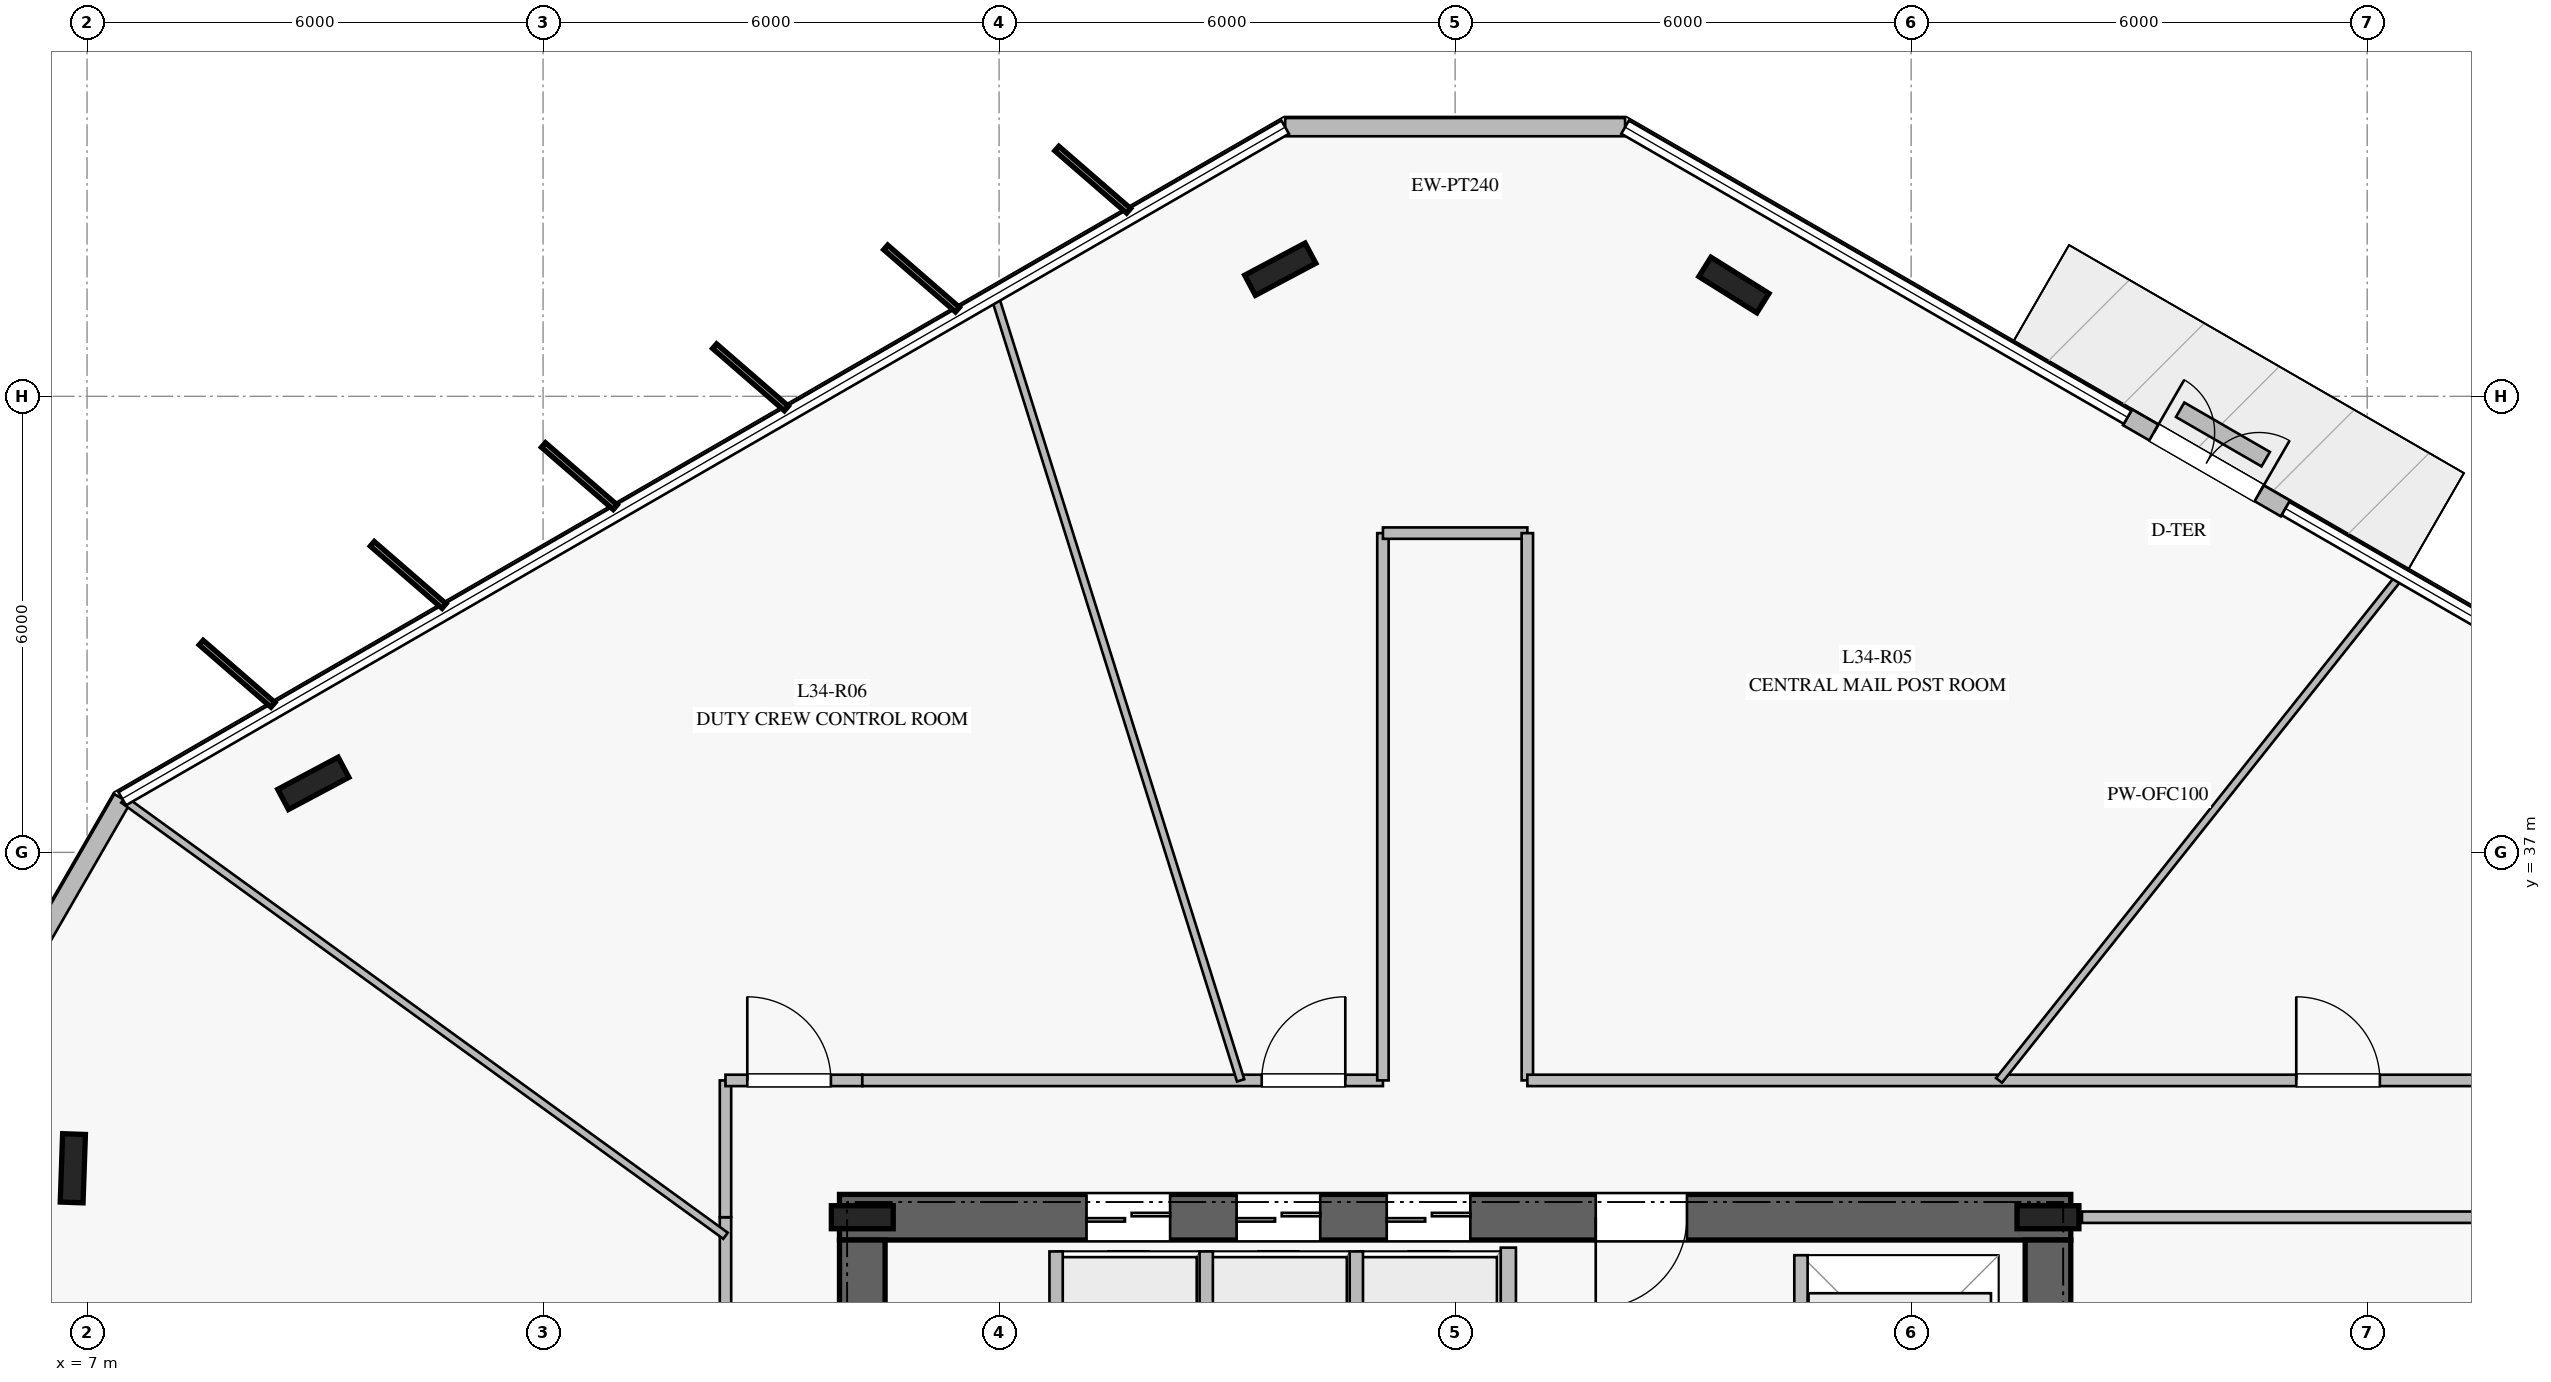
"""IFC4 building model, lengths in metres.
Left out: names, types, materials, properties, quantities, classifications, styles, units other than length and angle.
Written with IfcOpenShell. Run it as: python <this file> out.ifc"""

import sys

from ifc_helpers import new_model, si_unit, direction, frame, frame_2d, origin, origin_2d, place, context, subcontext, project, spatial, rectangle, i_section, extrude, element, fill, save


model = new_model("IFC4")
c1 = context("Model", 3, precision=1e-05, world=origin(), true_north=direction((0.0, 1.0)))
c2 = subcontext(c1, "Body", "Model", "MODEL_VIEW")
j1 = project(units=[si_unit("LENGTHUNIT", "METRE"), si_unit("PLANEANGLEUNIT", "RADIAN")], contexts=[c1])
p1 = place(None, origin())
s1 = spatial("IfcSite", under=j1, at=p1, CompositionType="ELEMENT")
p2 = place(p1, origin())
s2 = spatial("IfcBuilding", under=s1, at=p2, CompositionType="ELEMENT")
p3 = place(p2, frame((0.0, 0.0, 142.4)))
s3 = spatial("IfcBuildingStorey", under=s2, at=p3, CompositionType="ELEMENT", Elevation=142.4)
p4 = place(p3, frame((33.1, 32.2, 0.0), z_axis=(0.0, 0.0, 1.0), x_axis=(-1.0, 0.0, 0.0)))
e1 = element("IfcWall", 1, at=p4, inside=s3, PredefinedType="SHEAR", context=c2, shape_type="SweptSolid", body=[
    extrude(rectangle(XDim=16.2, YDim=0.6, at=frame_2d((8.1, 0.0))), origin(), (0.0, 0.0, 1.0), 3.76),
])
p5 = place(p4, frame((5.05, 0.0, 0.0)))
e2 = element("IfcOpeningElement", 2, at=p5, cuts=e1, PredefinedType="OPENING", context=c2, shape_type="SweptSolid", body=[
    extrude(rectangle(XDim=1.2, YDim=2.25, at=frame_2d((0.6, 1.125))), frame((0.0, 0.31, 0.0), z_axis=(0.0, -1.0, 0.0), x_axis=(1.0, 0.0, 0.0)), (0.0, 0.0, 1.0), 0.62),
])
p6 = place(p4, frame((11.85, 0.0, 0.0)))
e3 = element("IfcOpeningElement", 3, at=p6, cuts=e1, PredefinedType="OPENING", context=c2, shape_type="SweptSolid", body=[
    extrude(rectangle(XDim=1.1, YDim=2.2, at=frame_2d((0.55, 1.1))), frame((0.0, 0.31, 0.0), z_axis=(0.0, -1.0, 0.0), x_axis=(1.0, 0.0, 0.0)), (0.0, 0.0, 1.0), 0.62),
])
p7 = place(p4, frame((9.875, 0.0, 0.0)))
e4 = element("IfcOpeningElement", 4, at=p7, cuts=e1, PredefinedType="OPENING", context=c2, shape_type="SweptSolid", body=[
    extrude(rectangle(XDim=1.1, YDim=2.2, at=frame_2d((0.55, 1.1))), frame((0.0, 0.31, 0.0), z_axis=(0.0, -1.0, 0.0), x_axis=(1.0, 0.0, 0.0)), (0.0, 0.0, 1.0), 0.62),
])
p8 = place(p4, frame((7.9, 0.0, 0.0)))
e5 = element("IfcOpeningElement", 5, at=p8, cuts=e1, PredefinedType="OPENING", context=c2, shape_type="SweptSolid", body=[
    extrude(rectangle(XDim=1.1, YDim=2.2, at=frame_2d((0.55, 1.1))), frame((0.0, 0.31, 0.0), z_axis=(0.0, -1.0, 0.0), x_axis=(1.0, 0.0, 0.0)), (0.0, 0.0, 1.0), 0.62),
])
p9 = place(p3, frame((17.2, 31.9, 0.0), z_axis=(0.0, 0.0, 1.0), x_axis=(0.0, -1.0, 0.0)))
e6 = element("IfcWall", 6, at=p9, inside=s3, PredefinedType="SHEAR", context=c2, shape_type="SweptSolid", body=[
    extrude(rectangle(XDim=13.8, YDim=0.6, at=frame_2d((6.9, 0.0))), origin(), (0.0, 0.0, 1.0), 3.76),
])
p10 = place(p9, frame((2.05, 0.0, 0.0)))
e7 = element("IfcOpeningElement", 7, at=p10, cuts=e6, PredefinedType="OPENING", context=c2, shape_type="SweptSolid", body=[
    extrude(rectangle(XDim=1.5, YDim=2.2, at=frame_2d((0.75, 1.1))), frame((0.0, 0.31, 0.0), z_axis=(0.0, -1.0, 0.0), x_axis=(1.0, 0.0, 0.0)), (0.0, 0.0, 1.0), 0.62),
])
p11 = place(p3, frame((32.8, 18.1, 0.0), z_axis=(0.0, 0.0, 1.0), x_axis=(0.0, 1.0, 0.0)))
e8 = element("IfcWall", 8, at=p11, inside=s3, PredefinedType="SHEAR", context=c2, shape_type="SweptSolid", body=[
    extrude(rectangle(XDim=13.8, YDim=0.6, at=frame_2d((6.9, 0.0))), origin(), (0.0, 0.0, 1.0), 3.76),
])
for number, where, z_axis, x_axis in (
    (9, (32.8, 32.2, 0.0), (0.0, 0.0, 1.0), (1.0, 0.0, 0.0)),
    (10, (17.2, 32.2, 0.0), (0.0, 0.0, 1.0), (1.0, 0.0, 0.0)),
):
    element("IfcColumn", number, at=place(p3, frame(where, z_axis=z_axis, x_axis=x_axis)), inside=s3, PredefinedType="COLUMN", context=c2, shape_type="SweptSolid", body=[
        extrude(i_section(OverallWidth=0.303, OverallDepth=0.814, WebThickness=0.021, FlangeThickness=0.04, at=origin_2d()), origin(), (0.0, 0.0, 1.0), 4.0),
    ])
for number, where, z_axis, x_axis in (
    (11, (28.668, 44.464, 0.0), (0.0, 0.0, 1.0), (-0.848, 0.53, 0.0)),
    (12, (22.699, 44.672, 0.0), (0.0, 0.0, 1.0), (0.883, 0.469, 0.0)),
    (13, (9.977, 37.908, 0.0), (0.0, 0.0, 1.0), (0.883, 0.469, 0.0)),
    (14, (6.813, 32.844, 0.0), (0.0, 0.0, 1.0), (0.035, 0.999, 0.0)),
):
    element("IfcColumn", number, at=place(p3, frame(where, z_axis=z_axis, x_axis=x_axis)), inside=s3, PredefinedType="COLUMN", context=c2, shape_type="SweptSolid", body=[
        extrude(i_section(OverallWidth=0.3, OverallDepth=0.9, WebThickness=0.019, FlangeThickness=0.035, at=origin_2d()), origin(), (0.0, 0.0, 1.0), 4.0),
    ])
p12 = place(p3, frame((35.925, 41.524, 0.0), z_axis=(0.0, 0.0, 1.0), x_axis=(-0.865955154139, 0.50012165622, 0.0)))
e15 = element("IfcWall", 15, at=p12, inside=s3, PredefinedType="STANDARD", context=c2, shape_type="SweptSolid", body=[
    extrude(rectangle(XDim=2.4, YDim=0.24, at=frame_2d((1.2, 0.0))), origin(), (0.0, 0.0, 1.0), 3.76),
])
p13 = place(p12, frame((0.4, 0.0, 0.0)))
e16 = element("IfcOpeningElement", 16, at=p13, cuts=e15, PredefinedType="OPENING", context=c2, shape_type="SweptSolid", body=[
    extrude(rectangle(XDim=1.6, YDim=2.25, at=frame_2d((0.8, 1.125))), frame((0.0, 0.13, 0.0), z_axis=(0.0, -1.0, 0.0), x_axis=(1.0, 0.0, 0.0)), (0.0, 0.0, 1.0), 0.26),
])
p14 = place(p3, frame((27.236, 46.541, 0.0), z_axis=(0.0, 0.0, 1.0), x_axis=(-1.0, 0.0, 0.0)))
e17 = element("IfcWall", 17, at=p14, inside=s3, PredefinedType="STANDARD", context=c2, shape_type="SweptSolid", body=[
    extrude(rectangle(XDim=4.472, YDim=0.24, at=frame_2d((2.236, 0.0))), origin(), (0.0, 0.0, 1.0), 3.76),
])
p15 = place(p3, frame((7.463, 37.706, 0.0), z_axis=(0.0, 0.0, 1.0), x_axis=(-0.499886330694, -0.866091020843, 0.0)))
e18 = element("IfcWall", 18, at=p15, inside=s3, PredefinedType="STANDARD", context=c2, shape_type="SweptSolid", body=[
    extrude(rectangle(XDim=4.471, YDim=0.24, at=frame_2d((2.235, 0.0))), origin(), (0.0, 0.0, 1.0), 3.76),
])
p16 = place(p3, frame((35.665, 42.173, 0.0), z_axis=(0.0, 0.0, 1.0), x_axis=(-0.866085525409, 0.49989585183, 0.0)))
e19 = element("IfcWall", 19, at=p16, inside=s3, PredefinedType="USERDEFINED", context=c2, shape_type="SweptSolid", body=[
    extrude(rectangle(XDim=1.3, YDim=0.22, at=frame_2d((0.65, 0.0))), origin(), (0.0, 0.0, 1.0), 0.4),
])
p17 = place(p3, frame((25.7, 26.65, 0.0), z_axis=(0.0, 0.0, 1.0), x_axis=(0.0, 1.0, 0.0)))
e20 = element("IfcWall", 20, at=p17, inside=s3, PredefinedType="PARTITIONING", context=c2, shape_type="SweptSolid", body=[
    extrude(rectangle(XDim=5.15, YDim=0.2, at=frame_2d((2.575, 0.0))), origin(), (0.0, 0.0, 1.0), 3.76),
])
for number, where, z_axis, x_axis in (
    (21, (19.75, 29.4, 0.0), (0.0, 0.0, 1.0), (0.0, 1.0, 0.0)),
    (22, (21.725, 29.4, 0.0), (0.0, 0.0, 1.0), (0.0, 1.0, 0.0)),
    (23, (23.7, 29.4, 0.0), (0.0, 0.0, 1.0), (0.0, 1.0, 0.0)),
):
    element("IfcWall", number, at=place(p3, frame(where, z_axis=z_axis, x_axis=x_axis)), inside=s3, PredefinedType="PARTITIONING", context=c2, shape_type="SweptSolid", body=[
        extrude(rectangle(XDim=2.35, YDim=0.175, at=frame_2d((1.175, 0.0))), origin(), (0.0, 0.0, 1.0), 3.76),
    ])
p18 = place(p3, frame((29.55, 29.1, 0.0), z_axis=(0.0, 0.0, 1.0), x_axis=(0.0, 1.0, 0.0)))
e24 = element("IfcWall", 24, at=p18, inside=s3, PredefinedType="PARTITIONING", context=c2, shape_type="SweptSolid", body=[
    extrude(rectangle(XDim=2.6, YDim=0.175, at=frame_2d((1.3, 0.0))), origin(), (0.0, 0.0, 1.0), 3.76),
])
p19 = place(p18, frame((0.7, 0.0, 0.0)))
e25 = element("IfcOpeningElement", 25, at=p19, cuts=e24, PredefinedType="OPENING", context=c2, shape_type="SweptSolid", body=[
    extrude(rectangle(XDim=1.2, YDim=2.2, at=frame_2d((0.6, 1.1))), frame((0.0, 0.098, 0.0), z_axis=(0.0, -1.0, 0.0), x_axis=(1.0, 0.0, 0.0)), (0.0, 0.0, 1.0), 0.195),
])
p20 = place(p3, frame((15.4, 25.95, 0.0), z_axis=(0.0, 0.0, 1.0), x_axis=(0.0, 1.0, 0.0)))
e26 = element("IfcWall", 26, at=p20, inside=s3, PredefinedType="PARTITIONING", context=c2, shape_type="SweptSolid", body=[
    extrude(rectangle(XDim=6.25, YDim=0.15, at=frame_2d((3.125, 0.0))), origin(), (0.0, 0.0, 1.0), 3.21),
])
p21 = place(p3, frame((15.4, 32.2, 0.0), z_axis=(0.0, 0.0, 1.0), x_axis=(0.0, 1.0, 0.0)))
e27 = element("IfcWall", 27, at=p21, inside=s3, PredefinedType="PARTITIONING", context=c2, shape_type="SweptSolid", body=[
    extrude(rectangle(XDim=1.8, YDim=0.15, at=frame_2d((0.9, 0.0))), origin(), (0.0, 0.0, 1.0), 3.21),
])
p22 = place(p3, frame((15.4, 34.0, 0.0), z_axis=(0.0, 0.0, 1.0), x_axis=(1.0, 0.0, 0.0)))
e28 = element("IfcWall", 28, at=p22, inside=s3, PredefinedType="PARTITIONING", context=c2, shape_type="SweptSolid", body=[
    extrude(rectangle(XDim=1.8, YDim=0.15, at=frame_2d((0.9, 0.0))), origin(), (0.0, 0.0, 1.0), 3.76),
])
p23 = place(p22, frame((0.287, 0.0, 0.0)))
e29 = element("IfcOpeningElement", 29, at=p23, cuts=e28, PredefinedType="OPENING", context=c2, shape_type="SweptSolid", body=[
    extrude(rectangle(XDim=1.1, YDim=2.2, at=frame_2d((0.55, 1.1))), frame((0.0, 0.085, 0.0), z_axis=(0.0, -1.0, 0.0), x_axis=(1.0, 0.0, 0.0)), (0.0, 0.0, 1.0), 0.17),
])
p24 = place(p3, frame((17.2, 34.0, 0.0), z_axis=(0.0, 0.0, 1.0), x_axis=(1.0, 0.0, 0.0)))
e30 = element("IfcWall", 30, at=p24, inside=s3, PredefinedType="PARTITIONING", context=c2, shape_type="SweptSolid", body=[
    extrude(rectangle(XDim=6.85, YDim=0.15, at=frame_2d((3.425, 0.0))), origin(), (0.0, 0.0, 1.0), 3.21),
])
p25 = place(p24, frame((5.255, 0.0, 0.0)))
e31 = element("IfcOpeningElement", 31, at=p25, cuts=e30, PredefinedType="OPENING", context=c2, shape_type="SweptSolid", body=[
    extrude(rectangle(XDim=1.1, YDim=2.2, at=frame_2d((0.55, 1.1))), frame((0.0, 0.085, 0.0), z_axis=(0.0, -1.0, 0.0), x_axis=(1.0, 0.0, 0.0)), (0.0, 0.0, 1.0), 0.17),
])
p26 = place(p3, frame((24.05, 34.0, 0.0), z_axis=(0.0, 0.0, 1.0), x_axis=(0.0, 1.0, 0.0)))
e32 = element("IfcWall", 32, at=p26, inside=s3, PredefinedType="PARTITIONING", context=c2, shape_type="SweptSolid", body=[
    extrude(rectangle(XDim=7.2, YDim=0.15, at=frame_2d((3.6, 0.0))), origin(), (0.0, 0.0, 1.0), 3.36),
])
p27 = place(p3, frame((24.05, 41.2, 0.0), z_axis=(0.0, 0.0, 1.0), x_axis=(1.0, 0.0, 0.0)))
e33 = element("IfcWall", 33, at=p27, inside=s3, PredefinedType="PARTITIONING", context=c2, shape_type="SweptSolid", body=[
    extrude(rectangle(XDim=1.9, YDim=0.15, at=frame_2d((0.95, 0.0))), origin(), (0.0, 0.0, 1.0), 3.76),
])
p28 = place(p3, frame((25.95, 41.2, 0.0), z_axis=(0.0, 0.0, 1.0), x_axis=(0.0, -1.0, 0.0)))
e34 = element("IfcWall", 34, at=p28, inside=s3, PredefinedType="PARTITIONING", context=c2, shape_type="SweptSolid", body=[
    extrude(rectangle(XDim=7.2, YDim=0.15, at=frame_2d((3.6, 0.0))), origin(), (0.0, 0.0, 1.0), 3.36),
])
p29 = place(p3, frame((25.95, 34.0, 0.0), z_axis=(0.0, 0.0, 1.0), x_axis=(1.0, 0.0, 0.0)))
e35 = element("IfcWall", 35, at=p29, inside=s3, PredefinedType="PARTITIONING", context=c2, shape_type="SweptSolid", body=[
    extrude(rectangle(XDim=15.25, YDim=0.15, at=frame_2d((7.625, 0.0))), origin(), (0.0, 0.0, 1.0), 3.21),
])
p30 = place(p29, frame((10.117, 0.0, 0.0)))
e36 = element("IfcOpeningElement", 36, at=p30, cuts=e35, PredefinedType="OPENING", context=c2, shape_type="SweptSolid", body=[
    extrude(rectangle(XDim=1.1, YDim=2.2, at=frame_2d((0.55, 1.1))), frame((0.0, 0.085, 0.0), z_axis=(0.0, -1.0, 0.0), x_axis=(1.0, 0.0, 0.0)), (0.0, 0.0, 1.0), 0.17),
])
p31 = place(p3, frame((41.2, 32.2, 0.0), z_axis=(0.0, 0.0, 1.0), x_axis=(-1.0, 0.0, 0.0)))
e37 = element("IfcWall", 37, at=p31, inside=s3, PredefinedType="PARTITIONING", context=c2, shape_type="SweptSolid", body=[
    extrude(rectangle(XDim=7.953, YDim=0.15, at=frame_2d((3.977, 0.0))), origin(), (0.0, 0.0, 1.0), 3.21),
])
p32 = place(p3, frame((32.156, 34.0, 0.0), z_axis=(0.0, 0.0, 1.0), x_axis=(0.622366778273, 0.782725745905, 0.0)))
e38 = element("IfcWall", 38, at=p32, inside=s3, PredefinedType="MOVABLE", context=c2, shape_type="SweptSolid", body=[
    extrude(rectangle(XDim=8.476, YDim=0.1, at=frame_2d((4.238, 0.0))), origin(), (0.0, 0.0, 1.0), 3.16),
])
p33 = place(p3, frame((22.178, 34.0, 0.0), z_axis=(0.0, 0.0, 1.0), x_axis=(-0.299157035667, 0.954203892264, 0.0)))
e39 = element("IfcWall", 39, at=p33, inside=s3, PredefinedType="MOVABLE", context=c2, shape_type="SweptSolid", body=[
    extrude(rectangle(XDim=10.81, YDim=0.1, at=frame_2d((5.405, 0.0))), origin(), (0.0, 0.0, 1.0), 3.05),
])
p34 = place(p3, frame((15.4, 31.956, 0.0), z_axis=(0.0, 0.0, 1.0), x_axis=(-0.809787137788, 0.586723777832, 0.0)))
e40 = element("IfcWall", 40, at=p34, inside=s3, PredefinedType="MOVABLE", context=c2, shape_type="SweptSolid", body=[
    extrude(rectangle(XDim=9.781, YDim=0.1, at=frame_2d((4.891, 0.0))), origin(), (0.0, 0.0, 1.0), 3.16),
])
p35 = place(p13, frame((1.6, 0.0, 0.0), z_axis=(0.0, 0.0, 1.0), x_axis=(-1.0, 0.0, 0.0)))
e41 = element("IfcDoor", 41, at=p35, inside=s3, OperationType="DOUBLE_DOOR_SINGLE_SWING", PredefinedType="DOOR", context=c2, shape_type="SweptSolid", body=[
    extrude(rectangle(XDim=1.6, YDim=2.25, at=frame_2d((0.8, 1.125))), frame((0.0, 0.025, 0.0), z_axis=(0.0, -1.0, 0.0), x_axis=(1.0, 0.0, 0.0)), (0.0, 0.0, 1.0), 0.05),
])
fill(e16, e41)
p36 = place(p5, origin())
e42 = element("IfcDoor", 42, at=p36, inside=s3, OperationType="SINGLE_SWING_RIGHT", PredefinedType="DOOR", context=c2, shape_type="SweptSolid", body=[
    extrude(rectangle(XDim=1.2, YDim=2.25, at=frame_2d((0.6, 1.125))), frame((0.0, 0.025, 0.0), z_axis=(0.0, -1.0, 0.0), x_axis=(1.0, 0.0, 0.0)), (0.0, 0.0, 1.0), 0.05),
])
fill(e2, e42)
p37 = place(p6, origin())
e43 = element("IfcDoor", 43, at=p37, inside=s3, OperationType="DOUBLE_DOOR_SLIDING", PredefinedType="DOOR", context=c2, shape_type="SweptSolid", body=[
    extrude(rectangle(XDim=1.1, YDim=2.2, at=frame_2d((0.55, 1.1))), frame((0.0, 0.025, 0.0), z_axis=(0.0, -1.0, 0.0), x_axis=(1.0, 0.0, 0.0)), (0.0, 0.0, 1.0), 0.05),
])
fill(e3, e43)
p38 = place(p7, origin())
e44 = element("IfcDoor", 44, at=p38, inside=s3, OperationType="DOUBLE_DOOR_SLIDING", PredefinedType="DOOR", context=c2, shape_type="SweptSolid", body=[
    extrude(rectangle(XDim=1.1, YDim=2.2, at=frame_2d((0.55, 1.1))), frame((0.0, 0.025, 0.0), z_axis=(0.0, -1.0, 0.0), x_axis=(1.0, 0.0, 0.0)), (0.0, 0.0, 1.0), 0.05),
])
fill(e4, e44)
p39 = place(p8, origin())
e45 = element("IfcDoor", 45, at=p39, inside=s3, OperationType="DOUBLE_DOOR_SLIDING", PredefinedType="DOOR", context=c2, shape_type="SweptSolid", body=[
    extrude(rectangle(XDim=1.1, YDim=2.2, at=frame_2d((0.55, 1.1))), frame((0.0, 0.025, 0.0), z_axis=(0.0, -1.0, 0.0), x_axis=(1.0, 0.0, 0.0)), (0.0, 0.0, 1.0), 0.05),
])
fill(e5, e45)
p40 = place(p30, origin())
e46 = element("IfcDoor", 46, at=p40, inside=s3, OperationType="SINGLE_SWING_LEFT", PredefinedType="DOOR", context=c2, shape_type="SweptSolid", body=[
    extrude(rectangle(XDim=1.1, YDim=2.2, at=frame_2d((0.55, 1.1))), frame((0.0, 0.025, 0.0), z_axis=(0.0, -1.0, 0.0), x_axis=(1.0, 0.0, 0.0)), (0.0, 0.0, 1.0), 0.05),
])
fill(e36, e46)
p41 = place(p25, origin())
e47 = element("IfcDoor", 47, at=p41, inside=s3, OperationType="SINGLE_SWING_RIGHT", PredefinedType="DOOR", context=c2, shape_type="SweptSolid", body=[
    extrude(rectangle(XDim=1.1, YDim=2.2, at=frame_2d((0.55, 1.1))), frame((0.0, 0.025, 0.0), z_axis=(0.0, -1.0, 0.0), x_axis=(1.0, 0.0, 0.0)), (0.0, 0.0, 1.0), 0.05),
])
fill(e31, e47)
p42 = place(p23, origin())
e48 = element("IfcDoor", 48, at=p42, inside=s3, OperationType="SINGLE_SWING_LEFT", PredefinedType="DOOR", context=c2, shape_type="SweptSolid", body=[
    extrude(rectangle(XDim=1.1, YDim=2.2, at=frame_2d((0.55, 1.1))), frame((0.0, 0.025, 0.0), z_axis=(0.0, -1.0, 0.0), x_axis=(1.0, 0.0, 0.0)), (0.0, 0.0, 1.0), 0.05),
])
fill(e29, e48)
save(model, sys.argv[1])
